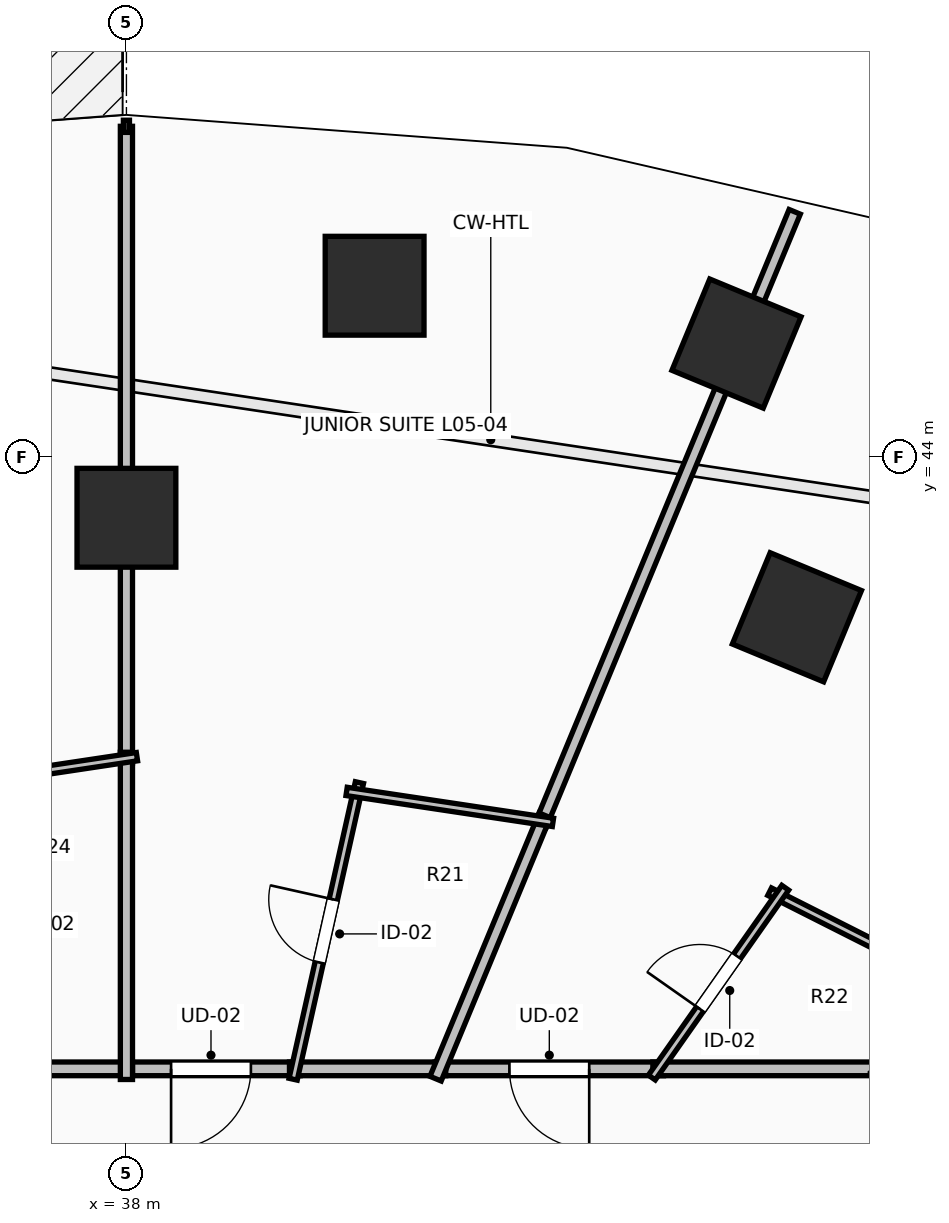
"""IFC4 building model, lengths in metres.
Left out: names, types, materials, properties, quantities, classifications, styles, units other than length and angle.
Written with IfcOpenShell. Run it as: python <this file> out.ifc"""

import sys

from ifc_helpers import new_model, si_unit, direction, frame, frame_2d, origin, origin_2d, place, context, subcontext, project, spatial, rectangle, extrude, element, fill, save


model = new_model("IFC4")
c1 = context("Model", 3, precision=1e-05, world=origin(), true_north=direction((0.0, 1.0)))
c2 = subcontext(c1, "Body", "Model", "MODEL_VIEW")
j1 = project(units=[si_unit("LENGTHUNIT", "METRE"), si_unit("PLANEANGLEUNIT", "RADIAN")], contexts=[c1])
p1 = place(None, origin())
s1 = spatial("IfcSite", under=j1, at=p1, CompositionType="ELEMENT")
p2 = place(p1, origin())
s2 = spatial("IfcBuilding", under=s1, at=p2, CompositionType="ELEMENT")
p3 = place(p2, frame((0.0, 0.0, 24.0)))
s3 = spatial("IfcBuildingStorey", under=s2, at=p3, CompositionType="ELEMENT", Elevation=24.0)
for number, where, z_axis, x_axis in (
    (1, (46.821, 41.891, 0.0), (0.0, 0.0, 1.0), (0.383, 0.924, 0.0)),
    (2, (38.0, 43.2, 0.0), (0.0, 0.0, 1.0), (0.0, 1.0, 0.0)),
    (3, (46.026, 45.492, 0.0), (0.0, 0.0, 1.0), (0.383, 0.924, 0.0)),
    (4, (41.265, 46.252, 0.0), (0.0, 0.0, 1.0), (0.0, 1.0, 0.0)),
):
    element("IfcColumn", number, at=place(p3, frame(where, z_axis=z_axis, x_axis=x_axis)), inside=s3, PredefinedType="COLUMN", context=c2, shape_type="SweptSolid", body=[
        extrude(rectangle(XDim=1.3, YDim=1.3, at=origin_2d()), origin(), (0.0, 0.0, 1.0), 3.5),
    ])
p4 = place(p3, frame((45.066, 35.95, 0.0), z_axis=(0.0, 0.0, 1.0), x_axis=(-1.0, 0.0, 0.0)))
e5 = element("IfcWall", 5, at=p4, inside=s3, PredefinedType="PARTITIONING", context=c2, shape_type="SweptSolid", body=[
    extrude(rectangle(XDim=3.005, YDim=0.18, at=frame_2d((1.502, 0.0))), origin(), (0.0, 0.0, 1.0), 3.24),
])
p5 = place(p4, frame((0.978, 0.0, 0.0)))
e6 = element("IfcOpeningElement", 6, at=p5, cuts=e5, PredefinedType="OPENING", context=c2, shape_type="SweptSolid", body=[
    extrude(rectangle(XDim=1.05, YDim=2.2, at=frame_2d((0.525, 1.1))), frame((0.0, 0.105, 0.0), z_axis=(0.0, -1.0, 0.0), x_axis=(1.0, 0.0, 0.0)), (0.0, 0.0, 1.0), 0.21),
])
p6 = place(p3, frame((48.03, 35.95, 0.0), z_axis=(0.0, 0.0, 1.0), x_axis=(-1.0, 0.0, 0.0)))
e7 = element("IfcWall", 7, at=p6, inside=s3, PredefinedType="PARTITIONING", context=c2, shape_type="SweptSolid", body=[
    extrude(rectangle(XDim=3.104, YDim=0.18, at=frame_2d((1.552, 0.0))), origin(), (0.0, 0.0, 1.0), 2.432),
])
p7 = place(p3, frame((40.285, 35.95, 0.0), z_axis=(0.0, 0.0, 1.0), x_axis=(-1.0, 0.0, 0.0)))
e8 = element("IfcWall", 8, at=p7, inside=s3, PredefinedType="PARTITIONING", context=c2, shape_type="SweptSolid", body=[
    extrude(rectangle(XDim=2.345, YDim=0.18, at=frame_2d((1.172, 0.0))), origin(), (0.0, 0.0, 1.0), 3.24),
])
p8 = place(p7, frame((0.647, 0.0, 0.0)))
e9 = element("IfcOpeningElement", 9, at=p8, cuts=e8, PredefinedType="OPENING", context=c2, shape_type="SweptSolid", body=[
    extrude(rectangle(XDim=1.05, YDim=2.2, at=frame_2d((0.525, 1.1))), frame((0.0, 0.105, 0.0), z_axis=(0.0, -1.0, 0.0), x_axis=(1.0, 0.0, 0.0)), (0.0, 0.0, 1.0), 0.21),
])
p9 = place(p3, frame((42.201, 35.95, 0.0), z_axis=(0.0, 0.0, 1.0), x_axis=(-1.0, 0.0, 0.0)))
e10 = element("IfcWall", 10, at=p9, inside=s3, PredefinedType="PARTITIONING", context=c2, shape_type="SweptSolid", body=[
    extrude(rectangle(XDim=2.056, YDim=0.18, at=frame_2d((1.028, 0.0))), origin(), (0.0, 0.0, 1.0), 3.24),
])
p10 = place(p3, frame((38.08, 35.95, 0.0), z_axis=(0.0, 0.0, 1.0), x_axis=(-1.0, 0.0, 0.0)))
e11 = element("IfcWall", 11, at=p10, inside=s3, PredefinedType="PARTITIONING", context=c2, shape_type="SweptSolid", body=[
    extrude(rectangle(XDim=1.897, YDim=0.18, at=frame_2d((0.948, 0.0))), origin(), (0.0, 0.0, 1.0), 3.24),
])
p11 = place(p3, frame((46.462, 38.281, 0.0), z_axis=(0.0, 0.0, 1.0), x_axis=(0.892486842203, -0.451073426944, 0.0)))
e12 = element("IfcWall", 12, at=p11, inside=s3, PredefinedType="PARTITIONING", context=c2, shape_type="SweptSolid", body=[
    extrude(rectangle(XDim=2.982, YDim=0.11, at=frame_2d((1.491, 0.0))), origin(), (0.0, 0.0, 1.0), 2.432),
])
p12 = place(p3, frame((44.913, 35.835, 0.0), z_axis=(0.0, 0.0, 1.0), x_axis=(0.574986040322, 0.818163219312, 0.0)))
e13 = element("IfcWall", 13, at=p12, inside=s3, PredefinedType="PARTITIONING", context=c2, shape_type="SweptSolid", body=[
    extrude(rectangle(XDim=3.052, YDim=0.11, at=frame_2d((1.526, 0.0))), origin(), (0.0, 0.0, 1.0), 2.922),
])
p13 = place(p12, frame((1.101, 0.0, 0.0)))
e14 = element("IfcOpeningElement", 14, at=p13, cuts=e13, PredefinedType="OPENING", context=c2, shape_type="SweptSolid", body=[
    extrude(rectangle(XDim=0.85, YDim=2.1, at=frame_2d((0.425, 1.05))), frame((0.0, 0.07, 0.0), z_axis=(0.0, -1.0, 0.0), x_axis=(1.0, 0.0, 0.0)), (0.0, 0.0, 1.0), 0.14),
])
p14 = place(p3, frame((46.792, 47.225, 0.0), z_axis=(0.0, 0.0, 1.0), x_axis=(-0.382750893248, -0.923851586413, 0.0)))
e15 = element("IfcWall", 15, at=p14, inside=s3, PredefinedType="PARTITIONING", context=c2, shape_type="SweptSolid", body=[
    extrude(rectangle(XDim=8.734, YDim=0.16, at=frame_2d((4.367, 0.0))), origin(), (0.0, 0.0, 1.0), 2.874),
])
p15 = place(p3, frame((43.503, 39.285, 0.0), z_axis=(0.0, 0.0, 1.0), x_axis=(-0.382867331148, -0.923803337697, 0.0)))
e16 = element("IfcWall", 16, at=p15, inside=s3, PredefinedType="PARTITIONING", context=c2, shape_type="SweptSolid", body=[
    extrude(rectangle(XDim=3.75, YDim=0.16, at=frame_2d((1.875, 0.0))), origin(), (0.0, 0.0, 1.0), 2.922),
])
p16 = place(p3, frame((40.194, 35.813, 0.0), z_axis=(0.0, 0.0, 1.0), x_axis=(0.21804880916, 0.975937865248, 0.0)))
e17 = element("IfcWall", 17, at=p16, inside=s3, PredefinedType="PARTITIONING", context=c2, shape_type="SweptSolid", body=[
    extrude(rectangle(XDim=3.998, YDim=0.11, at=frame_2d((1.999, 0.0))), origin(), (0.0, 0.0, 1.0), 2.922),
])
p17 = place(p16, frame((1.574, 0.0, 0.0)))
e18 = element("IfcOpeningElement", 18, at=p17, cuts=e17, PredefinedType="OPENING", context=c2, shape_type="SweptSolid", body=[
    extrude(rectangle(XDim=0.85, YDim=2.1, at=frame_2d((0.425, 1.05))), frame((0.0, 0.07, 0.0), z_axis=(0.0, -1.0, 0.0), x_axis=(1.0, 0.0, 0.0)), (0.0, 0.0, 1.0), 0.14),
])
p18 = place(p3, frame((40.896, 39.6, 0.0), z_axis=(0.0, 0.0, 1.0), x_axis=(0.98891024541, -0.148514398367, 0.0)))
e19 = element("IfcWall", 19, at=p18, inside=s3, PredefinedType="PARTITIONING", context=c2, shape_type="SweptSolid", body=[
    extrude(rectangle(XDim=2.745, YDim=0.11, at=frame_2d((1.373, 0.0))), origin(), (0.0, 0.0, 1.0), 3.24),
])
p19 = place(p3, frame((38.0, 48.35, 0.0), z_axis=(0.0, 0.0, 1.0), x_axis=(0.0, -1.0, 0.0)))
e20 = element("IfcWall", 20, at=p19, inside=s3, PredefinedType="PARTITIONING", context=c2, shape_type="SweptSolid", body=[
    extrude(rectangle(XDim=8.375, YDim=0.16, at=frame_2d((4.188, 0.0))), origin(), (0.0, 0.0, 1.0), 2.432),
])
p20 = place(p3, frame((38.0, 40.115, 0.0), z_axis=(0.0, 0.0, 1.0), x_axis=(0.0, -1.0, 0.0)))
e21 = element("IfcWall", 21, at=p20, inside=s3, PredefinedType="PARTITIONING", context=c2, shape_type="SweptSolid", body=[
    extrude(rectangle(XDim=4.305, YDim=0.16, at=frame_2d((2.152, 0.0))), origin(), (0.0, 0.0, 1.0), 2.922),
])
p21 = place(p3, frame((35.475, 39.656, 0.0), z_axis=(0.0, 0.0, 1.0), x_axis=(0.988878442063, 0.148726012595, 0.0)))
e22 = element("IfcWall", 22, at=p21, inside=s3, PredefinedType="PARTITIONING", context=c2, shape_type="SweptSolid", body=[
    extrude(rectangle(XDim=2.694, YDim=0.11, at=frame_2d((1.347, 0.0))), origin(), (0.0, 0.0, 1.0), 3.24),
])
p22 = place(p5, origin())
e23 = element("IfcDoor", 23, at=p22, inside=s3, OperationType="SINGLE_SWING_LEFT", PredefinedType="DOOR", context=c2, shape_type="SweptSolid", body=[
    extrude(rectangle(XDim=1.05, YDim=2.2, at=frame_2d((0.525, 1.1))), frame((0.0, 0.025, 0.0), z_axis=(0.0, -1.0, 0.0), x_axis=(1.0, 0.0, 0.0)), (0.0, 0.0, 1.0), 0.05),
])
fill(e6, e23)
p23 = place(p8, origin())
e24 = element("IfcDoor", 24, at=p23, inside=s3, OperationType="SINGLE_SWING_RIGHT", PredefinedType="DOOR", context=c2, shape_type="SweptSolid", body=[
    extrude(rectangle(XDim=1.05, YDim=2.2, at=frame_2d((0.525, 1.1))), frame((0.0, 0.025, 0.0), z_axis=(0.0, -1.0, 0.0), x_axis=(1.0, 0.0, 0.0)), (0.0, 0.0, 1.0), 0.05),
])
fill(e9, e24)
p24 = place(p13, origin())
e25 = element("IfcDoor", 25, at=p24, inside=s3, OperationType="SINGLE_SWING_LEFT", PredefinedType="DOOR", context=c2, shape_type="SweptSolid", body=[
    extrude(rectangle(XDim=0.85, YDim=2.1, at=frame_2d((0.425, 1.05))), frame((0.0, 0.025, 0.0), z_axis=(0.0, -1.0, 0.0), x_axis=(1.0, 0.0, 0.0)), (0.0, 0.0, 1.0), 0.05),
])
fill(e14, e25)
p25 = place(p17, origin())
e26 = element("IfcDoor", 26, at=p25, inside=s3, OperationType="SINGLE_SWING_RIGHT", PredefinedType="DOOR", context=c2, shape_type="SweptSolid", body=[
    extrude(rectangle(XDim=0.85, YDim=2.1, at=frame_2d((0.425, 1.05))), frame((0.0, 0.025, 0.0), z_axis=(0.0, -1.0, 0.0), x_axis=(1.0, 0.0, 0.0)), (0.0, 0.0, 1.0), 0.05),
])
fill(e18, e26)
save(model, sys.argv[1])
